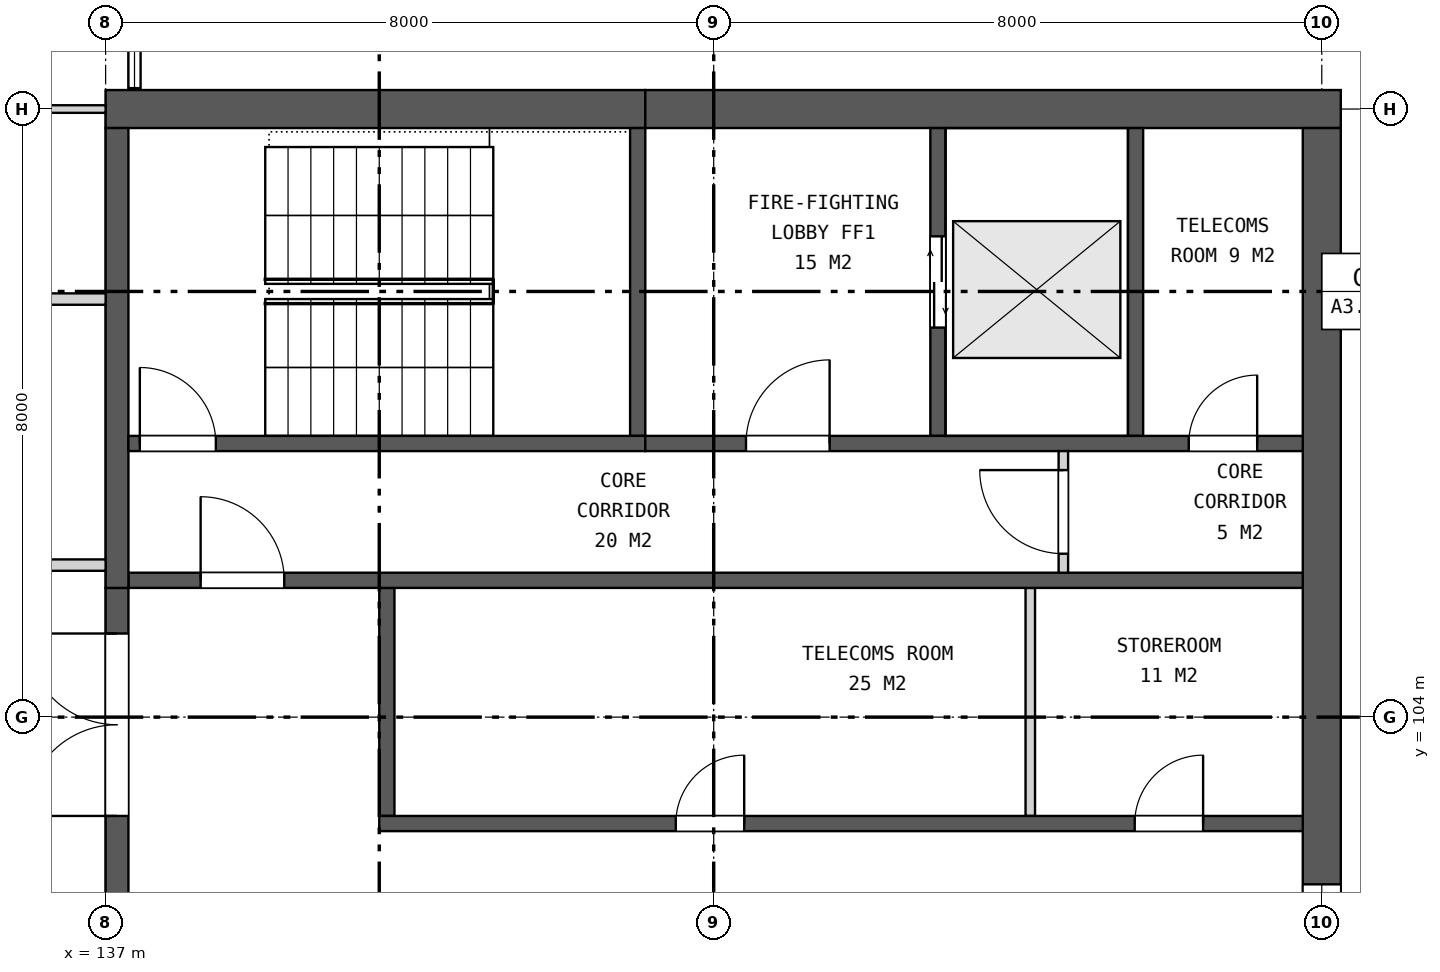
"""IFC4 building model, lengths in metres.
Left out: names, types, materials, properties, quantities, classifications, styles, units other than length and angle.
Written with IfcOpenShell. Run it as: python <this file> out.ifc"""

import sys

from ifc_helpers import new_model, si_unit, direction, frame, frame_2d, origin, place, context, subcontext, project, spatial, rectangle, extrude, element, fill, save


model = new_model("IFC4")
c1 = context("Model", 3, precision=1e-05, world=origin(), true_north=direction((0.0, 1.0)))
c2 = subcontext(c1, "Body", "Model", "MODEL_VIEW")
j1 = project(units=[si_unit("LENGTHUNIT", "METRE"), si_unit("PLANEANGLEUNIT", "RADIAN")], contexts=[c1])
p1 = place(None, origin())
s1 = spatial("IfcSite", under=j1, at=p1, CompositionType="ELEMENT")
p2 = place(p1, origin())
s2 = spatial("IfcBuilding", under=s1, at=p2, CompositionType="ELEMENT")
p3 = place(p2, frame((0.0, 0.0, 295.5)))
s3 = spatial("IfcBuildingStorey", under=s2, at=p3, CompositionType="ELEMENT", Elevation=295.5)
p4 = place(p3, frame((137.0, 112.0, 0.0), z_axis=(0.0, 0.0, 1.0), x_axis=(1.0, 0.0, 0.0)))
e1 = element("IfcWall", 1, at=p4, inside=s3, PredefinedType="SHEAR", context=c2, shape_type="SweptSolid", body=[
    extrude(rectangle(XDim=7.1, YDim=0.5, at=frame_2d((3.55, 0.0))), origin(), (0.0, 0.0, 1.0), 4.2),
])
p5 = place(p3, frame((144.1, 112.0, 0.0), z_axis=(0.0, 0.0, 1.0), x_axis=(1.0, 0.0, 0.0)))
e2 = element("IfcWall", 2, at=p5, inside=s3, PredefinedType="SHEAR", context=c2, shape_type="SweptSolid", body=[
    extrude(rectangle(XDim=9.15, YDim=0.5, at=frame_2d((4.575, 0.0))), origin(), (0.0, 0.0, 1.0), 4.2),
])
p6 = place(p3, frame((153.0, 88.25, 0.0), z_axis=(0.0, 0.0, 1.0), x_axis=(0.0, 1.0, 0.0)))
e3 = element("IfcWall", 3, at=p6, inside=s3, PredefinedType="SHEAR", context=c2, shape_type="SweptSolid", body=[
    extrude(rectangle(XDim=23.5, YDim=0.5, at=frame_2d((11.75, 0.0))), origin(), (0.0, 0.0, 1.0), 4.2),
])
p7 = place(p6, frame((9.95, 0.0, 0.15)))
e4 = element("IfcOpeningElement", 4, at=p7, cuts=e3, PredefinedType="OPENING", context=c2, shape_type="SweptSolid", body=[
    extrude(rectangle(XDim=3.6, YDim=3.0, at=frame_2d((1.8, 1.5))), frame((0.0, 0.26, 0.0), z_axis=(0.0, -1.0, 0.0), x_axis=(1.0, 0.0, 0.0)), (0.0, 0.0, 1.0), 0.52),
])
p8 = place(p3, frame((137.15, 94.3, 0.0), z_axis=(0.0, 0.0, 1.0), x_axis=(0.0, 1.0, 0.0)))
e5 = element("IfcWall", 5, at=p8, inside=s3, PredefinedType="SHEAR", context=c2, shape_type="SweptSolid", body=[
    extrude(rectangle(XDim=11.4, YDim=0.3, at=frame_2d((5.7, 0.0))), origin(), (0.0, 0.0, 1.0), 4.2),
])
p9 = place(p8, frame((0.6, 0.0, 0.0)))
e6 = element("IfcOpeningElement", 6, at=p9, cuts=e5, PredefinedType="OPENING", context=c2, shape_type="SweptSolid", body=[
    extrude(rectangle(XDim=2.4, YDim=2.4, at=frame_2d((1.2, 1.2))), frame((0.0, 0.16, 0.0), z_axis=(0.0, -1.0, 0.0), x_axis=(1.0, 0.0, 0.0)), (0.0, 0.0, 1.0), 0.32),
])
p10 = place(p8, frame((4.5, 0.0, 0.0)))
e7 = element("IfcOpeningElement", 7, at=p10, cuts=e5, PredefinedType="OPENING", context=c2, shape_type="SweptSolid", body=[
    extrude(rectangle(XDim=2.4, YDim=2.4, at=frame_2d((1.2, 1.2))), frame((0.0, 0.16, 0.0), z_axis=(0.0, -1.0, 0.0), x_axis=(1.0, 0.0, 0.0)), (0.0, 0.0, 1.0), 0.32),
])
p11 = place(p8, frame((8.4, 0.0, 0.0)))
e8 = element("IfcOpeningElement", 8, at=p11, cuts=e5, PredefinedType="OPENING", context=c2, shape_type="SweptSolid", body=[
    extrude(rectangle(XDim=2.4, YDim=2.4, at=frame_2d((1.2, 1.2))), frame((0.0, 0.16, 0.0), z_axis=(0.0, -1.0, 0.0), x_axis=(1.0, 0.0, 0.0)), (0.0, 0.0, 1.0), 0.32),
])
p12 = place(p3, frame((140.7, 102.7, 0.0), z_axis=(0.0, 0.0, 1.0), x_axis=(0.0, 1.0, 0.0)))
e9 = element("IfcWall", 9, at=p12, inside=s3, PredefinedType="SHEAR", context=c2, shape_type="SweptSolid", body=[
    extrude(rectangle(XDim=3.0, YDim=0.2, at=frame_2d((1.5, 0.0))), origin(), (0.0, 0.0, 1.0), 4.2),
])
p13 = place(p3, frame((149.165, 102.7, 0.0), z_axis=(0.0, 0.0, 1.0), x_axis=(0.0, 1.0, 0.0)))
e10 = element("IfcWall", 10, at=p13, inside=s3, PredefinedType="PARTITIONING", context=c2, shape_type="SweptSolid", body=[
    extrude(rectangle(XDim=3.0, YDim=0.125, at=frame_2d((1.5, 0.0))), origin(), (0.0, 0.0, 1.0), 4.2),
])
p14 = place(p3, frame((140.6, 102.6, 0.0), z_axis=(0.0, 0.0, 1.0), x_axis=(1.0, 0.0, 0.0)))
e11 = element("IfcWall", 11, at=p14, inside=s3, PredefinedType="SHEAR", context=c2, shape_type="SweptSolid", body=[
    extrude(rectangle(XDim=12.15, YDim=0.2, at=frame_2d((6.075, 0.0))), origin(), (0.0, 0.0, 1.0), 4.2),
])
p15 = place(p14, frame((3.901, 0.0, 0.0)))
e12 = element("IfcOpeningElement", 12, at=p15, cuts=e11, PredefinedType="OPENING", context=c2, shape_type="SweptSolid", body=[
    extrude(rectangle(XDim=0.9, YDim=2.1, at=frame_2d((0.45, 1.05))), frame((0.0, 0.11, 0.0), z_axis=(0.0, -1.0, 0.0), x_axis=(1.0, 0.0, 0.0)), (0.0, 0.0, 1.0), 0.22),
])
p16 = place(p14, frame((9.939, 0.0, 0.0)))
e13 = element("IfcOpeningElement", 13, at=p16, cuts=e11, PredefinedType="OPENING", context=c2, shape_type="SweptSolid", body=[
    extrude(rectangle(XDim=0.9, YDim=2.1, at=frame_2d((0.45, 1.05))), frame((0.0, 0.11, 0.0), z_axis=(0.0, -1.0, 0.0), x_axis=(1.0, 0.0, 0.0)), (0.0, 0.0, 1.0), 0.22),
])
p17 = place(p3, frame((137.3, 105.8, 0.0), z_axis=(0.0, 0.0, 1.0), x_axis=(1.0, 0.0, 0.0)))
e14 = element("IfcWall", 14, at=p17, inside=s3, PredefinedType="SHEAR", context=c2, shape_type="SweptSolid", body=[
    extrude(rectangle(XDim=15.45, YDim=0.2, at=frame_2d((7.725, 0.0))), origin(), (0.0, 0.0, 1.0), 4.2),
])
p18 = place(p17, frame((0.95, 0.0, 0.0)))
e15 = element("IfcOpeningElement", 15, at=p18, cuts=e14, PredefinedType="OPENING", context=c2, shape_type="SweptSolid", body=[
    extrude(rectangle(XDim=1.1, YDim=2.1, at=frame_2d((0.55, 1.05))), frame((0.0, 0.11, 0.0), z_axis=(0.0, -1.0, 0.0), x_axis=(1.0, 0.0, 0.0)), (0.0, 0.0, 1.0), 0.22),
])
p19 = place(p3, frame((137.15, 105.7, 0.0), z_axis=(0.0, 0.0, 1.0), x_axis=(0.0, 1.0, 0.0)))
e16 = element("IfcWall", 16, at=p19, inside=s3, PredefinedType="SHEAR", context=c2, shape_type="SweptSolid", body=[
    extrude(rectangle(XDim=6.05, YDim=0.3, at=frame_2d((3.025, 0.0))), origin(), (0.0, 0.0, 1.0), 4.2),
])
p20 = place(p3, frame((144.0, 107.7, 0.0), z_axis=(0.0, 0.0, 1.0), x_axis=(0.0, 1.0, 0.0)))
e17 = element("IfcWall", 17, at=p20, inside=s3, PredefinedType="SHEAR", context=c2, shape_type="SweptSolid", body=[
    extrude(rectangle(XDim=4.05, YDim=0.2, at=frame_2d((2.025, 0.0))), origin(), (0.0, 0.0, 1.0), 4.2),
])
p21 = place(p3, frame((147.95, 107.7, 0.0), z_axis=(0.0, 0.0, 1.0), x_axis=(0.0, 1.0, 0.0)))
e18 = element("IfcWall", 18, at=p21, inside=s3, PredefinedType="SHEAR", context=c2, shape_type="SweptSolid", body=[
    extrude(rectangle(XDim=4.05, YDim=0.2, at=frame_2d((2.025, 0.0))), origin(), (0.0, 0.0, 1.0), 4.2),
])
p22 = place(p21, frame((1.425, 0.0, 0.0)))
e19 = element("IfcOpeningElement", 19, at=p22, cuts=e18, PredefinedType="OPENING", context=c2, shape_type="SweptSolid", body=[
    extrude(rectangle(XDim=1.2, YDim=2.1, at=frame_2d((0.6, 1.05))), frame((0.0, 0.11, 0.0), z_axis=(0.0, -1.0, 0.0), x_axis=(1.0, 0.0, 0.0)), (0.0, 0.0, 1.0), 0.22),
])
p23 = place(p3, frame((150.55, 107.7, 0.0), z_axis=(0.0, 0.0, 1.0), x_axis=(0.0, 1.0, 0.0)))
e20 = element("IfcWall", 20, at=p23, inside=s3, PredefinedType="SHEAR", context=c2, shape_type="SweptSolid", body=[
    extrude(rectangle(XDim=4.05, YDim=0.2, at=frame_2d((2.025, 0.0))), origin(), (0.0, 0.0, 1.0), 4.2),
])
p24 = place(p3, frame((137.3, 107.6, 0.0), z_axis=(0.0, 0.0, 1.0), x_axis=(1.0, 0.0, 0.0)))
e21 = element("IfcWall", 21, at=p24, inside=s3, PredefinedType="SHEAR", context=c2, shape_type="SweptSolid", body=[
    extrude(rectangle(XDim=6.8, YDim=0.2, at=frame_2d((3.4, 0.0))), origin(), (0.0, 0.0, 1.0), 4.2),
])
p25 = place(p24, frame((0.15, 0.0, 0.0)))
e22 = element("IfcOpeningElement", 22, at=p25, cuts=e21, PredefinedType="OPENING", context=c2, shape_type="SweptSolid", body=[
    extrude(rectangle(XDim=1.0, YDim=2.1, at=frame_2d((0.5, 1.05))), frame((0.0, 0.11, 0.0), z_axis=(0.0, -1.0, 0.0), x_axis=(1.0, 0.0, 0.0)), (0.0, 0.0, 1.0), 0.22),
])
p26 = place(p3, frame((144.1, 107.6, 0.0), z_axis=(0.0, 0.0, 1.0), x_axis=(1.0, 0.0, 0.0)))
e23 = element("IfcWall", 23, at=p26, inside=s3, PredefinedType="SHEAR", context=c2, shape_type="SweptSolid", body=[
    extrude(rectangle(XDim=8.65, YDim=0.2, at=frame_2d((4.325, 0.0))), origin(), (0.0, 0.0, 1.0), 4.2),
])
p27 = place(p26, frame((1.325, 0.0, 0.0)))
e24 = element("IfcOpeningElement", 24, at=p27, cuts=e23, PredefinedType="OPENING", context=c2, shape_type="SweptSolid", body=[
    extrude(rectangle(XDim=1.1, YDim=2.1, at=frame_2d((0.55, 1.05))), frame((0.0, 0.11, 0.0), z_axis=(0.0, -1.0, 0.0), x_axis=(1.0, 0.0, 0.0)), (0.0, 0.0, 1.0), 0.22),
])
p28 = place(p26, frame((7.15, 0.0, 0.0)))
e25 = element("IfcOpeningElement", 25, at=p28, cuts=e23, PredefinedType="OPENING", context=c2, shape_type="SweptSolid", body=[
    extrude(rectangle(XDim=0.9, YDim=2.1, at=frame_2d((0.45, 1.05))), frame((0.0, 0.11, 0.0), z_axis=(0.0, -1.0, 0.0), x_axis=(1.0, 0.0, 0.0)), (0.0, 0.0, 1.0), 0.22),
])
p29 = place(p3, frame((149.6, 105.9, 0.0), z_axis=(0.0, 0.0, 1.0), x_axis=(0.0, 1.0, 0.0)))
e26 = element("IfcWall", 26, at=p29, inside=s3, PredefinedType="PARTITIONING", context=c2, shape_type="SweptSolid", body=[
    extrude(rectangle(XDim=1.6, YDim=0.125, at=frame_2d((0.8, 0.0))), origin(), (0.0, 0.0, 1.0), 4.2),
])
p30 = place(p29, frame((0.25, 0.0, 0.0)))
e27 = element("IfcOpeningElement", 27, at=p30, cuts=e26, PredefinedType="OPENING", context=c2, shape_type="SweptSolid", body=[
    extrude(rectangle(XDim=1.1, YDim=2.1, at=frame_2d((0.55, 1.05))), frame((0.0, 0.073, 0.0), z_axis=(0.0, -1.0, 0.0), x_axis=(1.0, 0.0, 0.0)), (0.0, 0.0, 1.0), 0.145),
])
for number, where, z_axis, x_axis in (
    (28, (131.475, 106.0, 0.0), (0.0, 0.0, 1.0), (1.0, 0.0, 0.0)),
    (29, (131.475, 109.5, 0.0), (0.0, 0.0, 1.0), (1.0, 0.0, 0.0)),
):
    element("IfcWall", number, at=place(p3, frame(where, z_axis=z_axis, x_axis=x_axis)), inside=s3, PredefinedType="PARTITIONING", context=c2, shape_type="SweptSolid", body=[
        extrude(rectangle(XDim=5.525, YDim=0.15, at=frame_2d((2.762, 0.0))), origin(), (0.0, 0.0, 1.0), 3.443),
    ])
p31 = place(p3, frame((131.475, 112.0, 0.0), z_axis=(0.0, 0.0, 1.0), x_axis=(1.0, 0.0, 0.0)))
e30 = element("IfcWall", 30, at=p31, inside=s3, PredefinedType="PARTITIONING", context=c2, shape_type="SweptSolid", body=[
    extrude(rectangle(XDim=5.525, YDim=0.1, at=frame_2d((2.762, 0.0))), origin(), (0.0, 0.0, 1.0), 3.443),
])
p32 = place(p7, origin())
e31 = element("IfcWindow", 31, at=p32, inside=s3, PartitioningType="SINGLE_PANEL", PredefinedType="WINDOW", context=c2, shape_type="SweptSolid", body=[
    extrude(rectangle(XDim=3.6, YDim=3.0, at=frame_2d((1.8, 1.5))), frame((0.0, 0.03, 0.0), z_axis=(0.0, -1.0, 0.0), x_axis=(1.0, 0.0, 0.0)), (0.0, 0.0, 1.0), 0.06),
])
fill(e4, e31)
p33 = place(p11, origin())
e32 = element("IfcDoor", 32, at=p33, inside=s3, OperationType="DOUBLE_DOOR_SINGLE_SWING", PredefinedType="DOOR", context=c2, shape_type="SweptSolid", body=[
    extrude(rectangle(XDim=2.4, YDim=2.4, at=frame_2d((1.2, 1.2))), frame((0.0, 0.025, 0.0), z_axis=(0.0, -1.0, 0.0), x_axis=(1.0, 0.0, 0.0)), (0.0, 0.0, 1.0), 0.05),
])
fill(e8, e32)
p34 = place(p15, origin())
e33 = element("IfcDoor", 33, at=p34, inside=s3, OperationType="SINGLE_SWING_RIGHT", PredefinedType="DOOR", context=c2, shape_type="SweptSolid", body=[
    extrude(rectangle(XDim=0.9, YDim=2.1, at=frame_2d((0.45, 1.05))), frame((0.0, 0.025, 0.0), z_axis=(0.0, -1.0, 0.0), x_axis=(1.0, 0.0, 0.0)), (0.0, 0.0, 1.0), 0.05),
])
fill(e12, e33)
p35 = place(p16, origin())
e34 = element("IfcDoor", 34, at=p35, inside=s3, OperationType="SINGLE_SWING_RIGHT", PredefinedType="DOOR", context=c2, shape_type="SweptSolid", body=[
    extrude(rectangle(XDim=0.9, YDim=2.1, at=frame_2d((0.45, 1.05))), frame((0.0, 0.025, 0.0), z_axis=(0.0, -1.0, 0.0), x_axis=(1.0, 0.0, 0.0)), (0.0, 0.0, 1.0), 0.05),
])
fill(e13, e34)
p36 = place(p18, origin())
e35 = element("IfcDoor", 35, at=p36, inside=s3, OperationType="SINGLE_SWING_LEFT", PredefinedType="DOOR", context=c2, shape_type="SweptSolid", body=[
    extrude(rectangle(XDim=1.1, YDim=2.1, at=frame_2d((0.55, 1.05))), frame((0.0, 0.025, 0.0), z_axis=(0.0, -1.0, 0.0), x_axis=(1.0, 0.0, 0.0)), (0.0, 0.0, 1.0), 0.05),
])
fill(e15, e35)
p37 = place(p22, origin())
e36 = element("IfcDoor", 36, at=p37, inside=s3, OperationType="DOUBLE_DOOR_SLIDING", PredefinedType="DOOR", context=c2, shape_type="SweptSolid", body=[
    extrude(rectangle(XDim=1.2, YDim=2.1, at=frame_2d((0.6, 1.05))), frame((0.0, 0.025, 0.0), z_axis=(0.0, -1.0, 0.0), x_axis=(1.0, 0.0, 0.0)), (0.0, 0.0, 1.0), 0.05),
])
fill(e19, e36)
p38 = place(p25, origin())
e37 = element("IfcDoor", 37, at=p38, inside=s3, OperationType="SINGLE_SWING_LEFT", PredefinedType="DOOR", context=c2, shape_type="SweptSolid", body=[
    extrude(rectangle(XDim=1.0, YDim=2.1, at=frame_2d((0.5, 1.05))), frame((0.0, 0.025, 0.0), z_axis=(0.0, -1.0, 0.0), x_axis=(1.0, 0.0, 0.0)), (0.0, 0.0, 1.0), 0.05),
])
fill(e22, e37)
p39 = place(p27, origin())
e38 = element("IfcDoor", 38, at=p39, inside=s3, OperationType="SINGLE_SWING_RIGHT", PredefinedType="DOOR", context=c2, shape_type="SweptSolid", body=[
    extrude(rectangle(XDim=1.1, YDim=2.1, at=frame_2d((0.55, 1.05))), frame((0.0, 0.025, 0.0), z_axis=(0.0, -1.0, 0.0), x_axis=(1.0, 0.0, 0.0)), (0.0, 0.0, 1.0), 0.05),
])
fill(e24, e38)
p40 = place(p28, origin())
e39 = element("IfcDoor", 39, at=p40, inside=s3, OperationType="SINGLE_SWING_RIGHT", PredefinedType="DOOR", context=c2, shape_type="SweptSolid", body=[
    extrude(rectangle(XDim=0.9, YDim=2.1, at=frame_2d((0.45, 1.05))), frame((0.0, 0.025, 0.0), z_axis=(0.0, -1.0, 0.0), x_axis=(1.0, 0.0, 0.0)), (0.0, 0.0, 1.0), 0.05),
])
fill(e25, e39)
p41 = place(p30, origin())
e40 = element("IfcDoor", 40, at=p41, inside=s3, OperationType="SINGLE_SWING_RIGHT", PredefinedType="DOOR", context=c2, shape_type="SweptSolid", body=[
    extrude(rectangle(XDim=1.1, YDim=2.1, at=frame_2d((0.55, 1.05))), frame((0.0, 0.025, 0.0), z_axis=(0.0, -1.0, 0.0), x_axis=(1.0, 0.0, 0.0)), (0.0, 0.0, 1.0), 0.05),
])
fill(e27, e40)
save(model, sys.argv[1])
